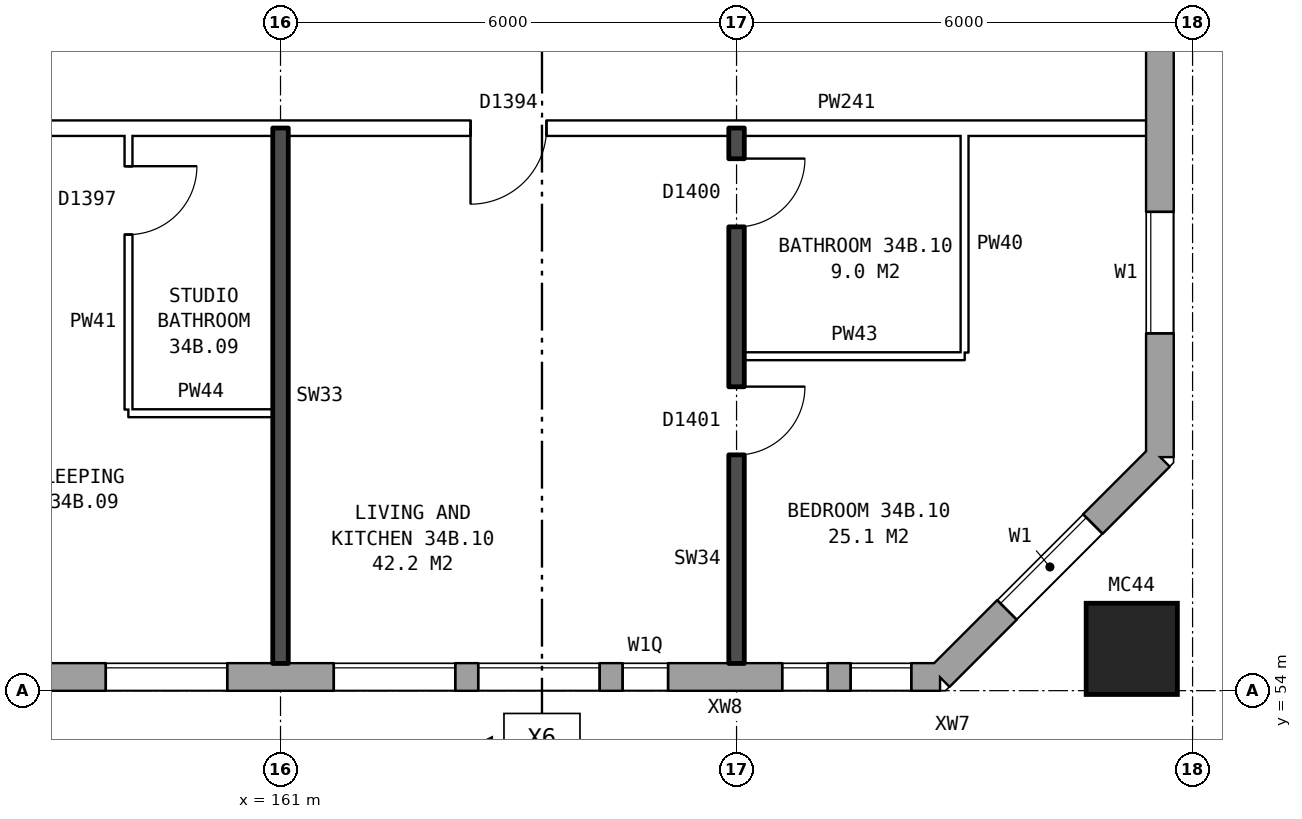
"""IFC4 building model, lengths in metres.
Left out: names, types, materials, properties, quantities, classifications, styles, units other than length and angle.
Written with IfcOpenShell. Run it as: python <this file> out.ifc"""

import sys

from ifc_helpers import new_model, si_unit, direction, frame, frame_2d, origin, origin_2d, place, context, subcontext, project, spatial, rectangle, hollow_rectangle, extrude, element, fill, save


model = new_model("IFC4")
c1 = context("Model", 3, precision=1e-05, world=origin(), true_north=direction((0.0, 1.0)))
c2 = subcontext(c1, "Body", "Model", "MODEL_VIEW")
j1 = project(units=[si_unit("LENGTHUNIT", "METRE"), si_unit("PLANEANGLEUNIT", "RADIAN")], contexts=[c1])
p1 = place(None, origin())
s1 = spatial("IfcSite", under=j1, at=p1, CompositionType="ELEMENT")
p2 = place(p1, origin())
s2 = spatial("IfcBuilding", under=s1, at=p2, CompositionType="ELEMENT")
p3 = place(p2, frame((0.0, 0.0, 123.7)))
s3 = spatial("IfcBuildingStorey", under=s2, at=p3, CompositionType="ELEMENT", Elevation=123.7)
p4 = place(p3, frame((172.2, 54.55, 0.0), z_axis=(0.0, 0.0, 1.0), x_axis=(1.0, 0.0, 0.0)))
e1 = element("IfcColumn", 1, at=p4, inside=s3, PredefinedType="COLUMN", context=c2, shape_type="SweptSolid", body=[
    extrude(hollow_rectangle(XDim=1.2, YDim=1.2, WallThickness=0.065, at=origin_2d()), origin(), (0.0, 0.0, 1.0), 3.1),
])
p5 = place(p3, frame((134.075, 54.18, 0.0), z_axis=(0.0, 0.0, 1.0), x_axis=(1.0, 0.0, 0.0)))
e2 = element("IfcWall", 2, at=p5, inside=s3, PredefinedType="STANDARD", context=c2, shape_type="SweptSolid", body=[
    extrude(rectangle(XDim=35.601, YDim=0.36, at=frame_2d((17.8, 0.0))), origin(), (0.0, 0.0, 1.0), 2.85),
])
p6 = place(p5, frame((0.3, 0.0, 0.8)))
e3 = element("IfcOpeningElement", 3, at=p6, cuts=e2, PredefinedType="OPENING", context=c2, shape_type="SweptSolid", body=[
    extrude(rectangle(XDim=0.8, YDim=1.8, at=frame_2d((0.4, 0.9))), frame((0.0, 0.19, 0.0), z_axis=(0.0, -1.0, 0.0), x_axis=(1.0, 0.0, 0.0)), (0.0, 0.0, 1.0), 0.38),
])
p7 = place(p5, frame((3.425, 0.0, 0.8)))
e4 = element("IfcOpeningElement", 4, at=p7, cuts=e2, PredefinedType="OPENING", context=c2, shape_type="SweptSolid", body=[
    extrude(rectangle(XDim=1.0, YDim=1.2, at=frame_2d((0.5, 0.6))), frame((0.0, 0.19, 0.0), z_axis=(0.0, -1.0, 0.0), x_axis=(1.0, 0.0, 0.0)), (0.0, 0.0, 1.0), 0.38),
])
p8 = place(p5, frame((6.625, 0.0, 0.8)))
e5 = element("IfcOpeningElement", 5, at=p8, cuts=e2, PredefinedType="OPENING", context=c2, shape_type="SweptSolid", body=[
    extrude(rectangle(XDim=1.6, YDim=1.8, at=frame_2d((0.8, 0.9))), frame((0.0, 0.19, 0.0), z_axis=(0.0, -1.0, 0.0), x_axis=(1.0, 0.0, 0.0)), (0.0, 0.0, 1.0), 0.38),
])
p9 = place(p5, frame((9.625, 0.0, 0.8)))
e6 = element("IfcOpeningElement", 6, at=p9, cuts=e2, PredefinedType="OPENING", context=c2, shape_type="SweptSolid", body=[
    extrude(rectangle(XDim=1.6, YDim=1.8, at=frame_2d((0.8, 0.9))), frame((0.0, 0.19, 0.0), z_axis=(0.0, -1.0, 0.0), x_axis=(1.0, 0.0, 0.0)), (0.0, 0.0, 1.0), 0.38),
])
p10 = place(p5, frame((12.625, 0.0, 0.8)))
e7 = element("IfcOpeningElement", 7, at=p10, cuts=e2, PredefinedType="OPENING", context=c2, shape_type="SweptSolid", body=[
    extrude(rectangle(XDim=1.6, YDim=1.8, at=frame_2d((0.8, 0.9))), frame((0.0, 0.19, 0.0), z_axis=(0.0, -1.0, 0.0), x_axis=(1.0, 0.0, 0.0)), (0.0, 0.0, 1.0), 0.38),
])
p11 = place(p5, frame((15.625, 0.0, 0.8)))
e8 = element("IfcOpeningElement", 8, at=p11, cuts=e2, PredefinedType="OPENING", context=c2, shape_type="SweptSolid", body=[
    extrude(rectangle(XDim=1.6, YDim=1.8, at=frame_2d((0.8, 0.9))), frame((0.0, 0.19, 0.0), z_axis=(0.0, -1.0, 0.0), x_axis=(1.0, 0.0, 0.0)), (0.0, 0.0, 1.0), 0.38),
])
p12 = place(p5, frame((18.625, 0.0, 0.8)))
e9 = element("IfcOpeningElement", 9, at=p12, cuts=e2, PredefinedType="OPENING", context=c2, shape_type="SweptSolid", body=[
    extrude(rectangle(XDim=1.6, YDim=1.8, at=frame_2d((0.8, 0.9))), frame((0.0, 0.19, 0.0), z_axis=(0.0, -1.0, 0.0), x_axis=(1.0, 0.0, 0.0)), (0.0, 0.0, 1.0), 0.38),
])
p13 = place(p5, frame((21.625, 0.0, 0.8)))
e10 = element("IfcOpeningElement", 10, at=p13, cuts=e2, PredefinedType="OPENING", context=c2, shape_type="SweptSolid", body=[
    extrude(rectangle(XDim=1.6, YDim=1.8, at=frame_2d((0.8, 0.9))), frame((0.0, 0.19, 0.0), z_axis=(0.0, -1.0, 0.0), x_axis=(1.0, 0.0, 0.0)), (0.0, 0.0, 1.0), 0.38),
])
p14 = place(p5, frame((24.625, 0.0, 0.8)))
e11 = element("IfcOpeningElement", 11, at=p14, cuts=e2, PredefinedType="OPENING", context=c2, shape_type="SweptSolid", body=[
    extrude(rectangle(XDim=1.6, YDim=1.8, at=frame_2d((0.8, 0.9))), frame((0.0, 0.19, 0.0), z_axis=(0.0, -1.0, 0.0), x_axis=(1.0, 0.0, 0.0)), (0.0, 0.0, 1.0), 0.38),
])
p15 = place(p5, frame((27.625, 0.0, 0.8)))
e12 = element("IfcOpeningElement", 12, at=p15, cuts=e2, PredefinedType="OPENING", context=c2, shape_type="SweptSolid", body=[
    extrude(rectangle(XDim=1.6, YDim=1.8, at=frame_2d((0.8, 0.9))), frame((0.0, 0.19, 0.0), z_axis=(0.0, -1.0, 0.0), x_axis=(1.0, 0.0, 0.0)), (0.0, 0.0, 1.0), 0.38),
])
p16 = place(p5, frame((29.525, 0.0, 0.8)))
e13 = element("IfcOpeningElement", 13, at=p16, cuts=e2, PredefinedType="OPENING", context=c2, shape_type="SweptSolid", body=[
    extrude(rectangle(XDim=1.6, YDim=1.8, at=frame_2d((0.8, 0.9))), frame((0.0, 0.19, 0.0), z_axis=(0.0, -1.0, 0.0), x_axis=(1.0, 0.0, 0.0)), (0.0, 0.0, 1.0), 0.38),
])
p17 = place(p5, frame((33.525, 0.0, 1.7)))
e14 = element("IfcOpeningElement", 14, at=p17, cuts=e2, PredefinedType="OPENING", context=c2, shape_type="SweptSolid", body=[
    extrude(rectangle(XDim=0.6, YDim=0.9, at=frame_2d((0.3, 0.45))), frame((0.0, 0.19, 0.0), z_axis=(0.0, -1.0, 0.0), x_axis=(1.0, 0.0, 0.0)), (0.0, 0.0, 1.0), 0.38),
])
p18 = place(p5, frame((1.4, 0.0, 1.6)))
e15 = element("IfcOpeningElement", 15, at=p18, cuts=e2, PredefinedType="OPENING", context=c2, shape_type="SweptSolid", body=[
    extrude(rectangle(XDim=0.6, YDim=0.9, at=frame_2d((0.3, 0.45))), frame((0.0, 0.19, 0.0), z_axis=(0.0, -1.0, 0.0), x_axis=(1.0, 0.0, 0.0)), (0.0, 0.0, 1.0), 0.38),
])
p19 = place(p5, frame((4.725, 0.0, 0.8)))
e16 = element("IfcOpeningElement", 16, at=p19, cuts=e2, PredefinedType="OPENING", context=c2, shape_type="SweptSolid", body=[
    extrude(rectangle(XDim=1.4, YDim=1.8, at=frame_2d((0.7, 0.9))), frame((0.0, 0.19, 0.0), z_axis=(0.0, -1.0, 0.0), x_axis=(1.0, 0.0, 0.0)), (0.0, 0.0, 1.0), 0.38),
])
p20 = place(p5, frame((31.425, 0.0, 0.8)))
e17 = element("IfcOpeningElement", 17, at=p20, cuts=e2, PredefinedType="OPENING", context=c2, shape_type="SweptSolid", body=[
    extrude(rectangle(XDim=0.6, YDim=1.2, at=frame_2d((0.3, 0.6))), frame((0.0, 0.19, 0.0), z_axis=(0.0, -1.0, 0.0), x_axis=(1.0, 0.0, 0.0)), (0.0, 0.0, 1.0), 0.38),
])
p21 = place(p5, frame((34.425, 0.0, 0.8)))
e18 = element("IfcOpeningElement", 18, at=p21, cuts=e2, PredefinedType="OPENING", context=c2, shape_type="SweptSolid", body=[
    extrude(rectangle(XDim=0.8, YDim=1.8, at=frame_2d((0.4, 0.9))), frame((0.0, 0.19, 0.0), z_axis=(0.0, -1.0, 0.0), x_axis=(1.0, 0.0, 0.0)), (0.0, 0.0, 1.0), 0.38),
])
p22 = place(p3, frame((169.675, 54.18, 0.0), z_axis=(0.0, 0.0, 1.0), x_axis=(0.707106781187, 0.707106781187, 0.0)))
e19 = element("IfcWall", 19, at=p22, inside=s3, PredefinedType="STANDARD", context=c2, shape_type="SweptSolid", body=[
    extrude(rectangle(XDim=4.094, YDim=0.36, at=frame_2d((2.047, 0.0))), origin(), (0.0, 0.0, 1.0), 2.85),
])
p23 = place(p22, frame((1.247, 0.0, 0.8)))
e20 = element("IfcOpeningElement", 20, at=p23, cuts=e19, PredefinedType="OPENING", context=c2, shape_type="SweptSolid", body=[
    extrude(rectangle(XDim=1.6, YDim=1.8, at=frame_2d((0.8, 0.9))), frame((0.0, 0.19, 0.0), z_axis=(0.0, -1.0, 0.0), x_axis=(1.0, 0.0, 0.0)), (0.0, 0.0, 1.0), 0.38),
])
p24 = place(p3, frame((172.57, 57.075, 0.0), z_axis=(0.0, 0.0, 1.0), x_axis=(0.0, 1.0, 0.0)))
e21 = element("IfcWall", 21, at=p24, inside=s3, PredefinedType="STANDARD", context=c2, shape_type="SweptSolid", body=[
    extrude(rectangle(XDim=25.851, YDim=0.36, at=frame_2d((12.925, 0.0))), origin(), (0.0, 0.0, 1.0), 2.85),
])
p25 = place(p24, frame((1.625, 0.0, 0.8)))
e22 = element("IfcOpeningElement", 22, at=p25, cuts=e21, PredefinedType="OPENING", context=c2, shape_type="SweptSolid", body=[
    extrude(rectangle(XDim=1.6, YDim=1.8, at=frame_2d((0.8, 0.9))), frame((0.0, 0.19, 0.0), z_axis=(0.0, -1.0, 0.0), x_axis=(1.0, 0.0, 0.0)), (0.0, 0.0, 1.0), 0.38),
])
p26 = place(p24, frame((5.775, 0.0, 0.8)))
e23 = element("IfcOpeningElement", 23, at=p26, cuts=e21, PredefinedType="OPENING", context=c2, shape_type="SweptSolid", body=[
    extrude(rectangle(XDim=0.6, YDim=0.9, at=frame_2d((0.3, 0.45))), frame((0.0, 0.19, 0.0), z_axis=(0.0, -1.0, 0.0), x_axis=(1.0, 0.0, 0.0)), (0.0, 0.0, 1.0), 0.38),
])
p27 = place(p24, frame((7.625, 0.0, 0.8)))
e24 = element("IfcOpeningElement", 24, at=p27, cuts=e21, PredefinedType="OPENING", context=c2, shape_type="SweptSolid", body=[
    extrude(rectangle(XDim=1.6, YDim=1.8, at=frame_2d((0.8, 0.9))), frame((0.0, 0.19, 0.0), z_axis=(0.0, -1.0, 0.0), x_axis=(1.0, 0.0, 0.0)), (0.0, 0.0, 1.0), 0.38),
])
p28 = place(p24, frame((10.625, 0.0, 0.8)))
e25 = element("IfcOpeningElement", 25, at=p28, cuts=e21, PredefinedType="OPENING", context=c2, shape_type="SweptSolid", body=[
    extrude(rectangle(XDim=1.6, YDim=1.8, at=frame_2d((0.8, 0.9))), frame((0.0, 0.19, 0.0), z_axis=(0.0, -1.0, 0.0), x_axis=(1.0, 0.0, 0.0)), (0.0, 0.0, 1.0), 0.38),
])
p29 = place(p24, frame((13.625, 0.0, 0.8)))
e26 = element("IfcOpeningElement", 26, at=p29, cuts=e21, PredefinedType="OPENING", context=c2, shape_type="SweptSolid", body=[
    extrude(rectangle(XDim=1.6, YDim=1.8, at=frame_2d((0.8, 0.9))), frame((0.0, 0.19, 0.0), z_axis=(0.0, -1.0, 0.0), x_axis=(1.0, 0.0, 0.0)), (0.0, 0.0, 1.0), 0.38),
])
p30 = place(p24, frame((16.625, 0.0, 0.8)))
e27 = element("IfcOpeningElement", 27, at=p30, cuts=e21, PredefinedType="OPENING", context=c2, shape_type="SweptSolid", body=[
    extrude(rectangle(XDim=1.6, YDim=1.8, at=frame_2d((0.8, 0.9))), frame((0.0, 0.19, 0.0), z_axis=(0.0, -1.0, 0.0), x_axis=(1.0, 0.0, 0.0)), (0.0, 0.0, 1.0), 0.38),
])
p31 = place(p24, frame((6.675, 0.0, 0.8)))
e28 = element("IfcOpeningElement", 28, at=p31, cuts=e21, PredefinedType="OPENING", context=c2, shape_type="SweptSolid", body=[
    extrude(rectangle(XDim=0.6, YDim=1.5, at=frame_2d((0.3, 0.75))), frame((0.0, 0.19, 0.0), z_axis=(0.0, -1.0, 0.0), x_axis=(1.0, 0.0, 0.0)), (0.0, 0.0, 1.0), 0.38),
])
p32 = place(p24, frame((22.625, 0.0, 0.8)))
e29 = element("IfcOpeningElement", 29, at=p32, cuts=e21, PredefinedType="OPENING", context=c2, shape_type="SweptSolid", body=[
    extrude(rectangle(XDim=1.6, YDim=1.8, at=frame_2d((0.8, 0.9))), frame((0.0, 0.19, 0.0), z_axis=(0.0, -1.0, 0.0), x_axis=(1.0, 0.0, 0.0)), (0.0, 0.0, 1.0), 0.38),
])
p33 = place(p24, frame((9.525, 0.0, 0.8)))
e30 = element("IfcOpeningElement", 30, at=p33, cuts=e21, PredefinedType="OPENING", context=c2, shape_type="SweptSolid", body=[
    extrude(rectangle(XDim=0.8, YDim=1.8, at=frame_2d((0.4, 0.9))), frame((0.0, 0.19, 0.0), z_axis=(0.0, -1.0, 0.0), x_axis=(1.0, 0.0, 0.0)), (0.0, 0.0, 1.0), 0.38),
])
p34 = place(p24, frame((12.525, 0.0, 0.8)))
e31 = element("IfcOpeningElement", 31, at=p34, cuts=e21, PredefinedType="OPENING", context=c2, shape_type="SweptSolid", body=[
    extrude(rectangle(XDim=0.8, YDim=1.8, at=frame_2d((0.4, 0.9))), frame((0.0, 0.19, 0.0), z_axis=(0.0, -1.0, 0.0), x_axis=(1.0, 0.0, 0.0)), (0.0, 0.0, 1.0), 0.38),
])
p35 = place(p24, frame((15.525, 0.0, 0.8)))
e32 = element("IfcOpeningElement", 32, at=p35, cuts=e21, PredefinedType="OPENING", context=c2, shape_type="SweptSolid", body=[
    extrude(rectangle(XDim=0.8, YDim=1.8, at=frame_2d((0.4, 0.9))), frame((0.0, 0.19, 0.0), z_axis=(0.0, -1.0, 0.0), x_axis=(1.0, 0.0, 0.0)), (0.0, 0.0, 1.0), 0.38),
])
p36 = place(p24, frame((18.525, 0.0, 0.8)))
e33 = element("IfcOpeningElement", 33, at=p36, cuts=e21, PredefinedType="OPENING", context=c2, shape_type="SweptSolid", body=[
    extrude(rectangle(XDim=0.6, YDim=1.5, at=frame_2d((0.3, 0.75))), frame((0.0, 0.19, 0.0), z_axis=(0.0, -1.0, 0.0), x_axis=(1.0, 0.0, 0.0)), (0.0, 0.0, 1.0), 0.38),
])
p37 = place(p24, frame((19.425, 0.0, 0.8)))
e34 = element("IfcOpeningElement", 34, at=p37, cuts=e21, PredefinedType="OPENING", context=c2, shape_type="SweptSolid", body=[
    extrude(rectangle(XDim=0.6, YDim=0.9, at=frame_2d((0.3, 0.45))), frame((0.0, 0.19, 0.0), z_axis=(0.0, -1.0, 0.0), x_axis=(1.0, 0.0, 0.0)), (0.0, 0.0, 1.0), 0.38),
])
p38 = place(p3, frame((159.0, 57.65, 0.0), z_axis=(0.0, 0.0, 1.0), x_axis=(1.0, 0.0, 0.0)))
e35 = element("IfcWall", 35, at=p38, inside=s3, PredefinedType="PARTITIONING", context=c2, shape_type="SweptSolid", body=[
    extrude(rectangle(XDim=1.9, YDim=0.1, at=frame_2d((0.95, 0.0))), origin(), (0.0, 0.0, 1.0), 2.85),
])
p39 = place(p3, frame((167.1, 58.4, 0.0), z_axis=(0.0, 0.0, 1.0), x_axis=(1.0, 0.0, 0.0)))
e36 = element("IfcWall", 36, at=p39, inside=s3, PredefinedType="PARTITIONING", context=c2, shape_type="SweptSolid", body=[
    extrude(rectangle(XDim=2.9, YDim=0.1, at=frame_2d((1.45, 0.0))), origin(), (0.0, 0.0, 1.0), 2.85),
])
p40 = place(p3, frame((155.1, 61.4, 0.0), z_axis=(0.0, 0.0, 1.0), x_axis=(1.0, 0.0, 0.0)))
e37 = element("IfcWall", 37, at=p40, inside=s3, PredefinedType="PARTITIONING", context=c2, shape_type="SweptSolid", body=[
    extrude(rectangle(XDim=17.29, YDim=0.2, at=frame_2d((8.645, 0.0))), origin(), (0.0, 0.0, 1.0), 2.85),
])
p41 = place(p40, frame((1.45, 0.0, 0.0)))
e38 = element("IfcOpeningElement", 38, at=p41, cuts=e37, PredefinedType="OPENING", context=c2, shape_type="SweptSolid", body=[
    extrude(rectangle(XDim=1.0, YDim=2.1, at=frame_2d((0.5, 1.05))), frame((0.0, 0.11, 0.0), z_axis=(0.0, -1.0, 0.0), x_axis=(1.0, 0.0, 0.0)), (0.0, 0.0, 1.0), 0.22),
])
p42 = place(p40, frame((8.4, 0.0, 0.0)))
e39 = element("IfcOpeningElement", 39, at=p42, cuts=e37, PredefinedType="OPENING", context=c2, shape_type="SweptSolid", body=[
    extrude(rectangle(XDim=1.0, YDim=2.1, at=frame_2d((0.5, 1.05))), frame((0.0, 0.11, 0.0), z_axis=(0.0, -1.0, 0.0), x_axis=(1.0, 0.0, 0.0)), (0.0, 0.0, 1.0), 0.22),
])
p43 = place(p3, frame((159.0, 57.7, 0.0), z_axis=(0.0, 0.0, 1.0), x_axis=(0.0, 1.0, 0.0)))
e40 = element("IfcWall", 40, at=p43, inside=s3, PredefinedType="PARTITIONING", context=c2, shape_type="SweptSolid", body=[
    extrude(rectangle(XDim=3.6, YDim=0.1, at=frame_2d((1.8, 0.0))), origin(), (0.0, 0.0, 1.0), 2.85),
])
p44 = place(p43, frame((2.3, 0.0, 0.0)))
e41 = element("IfcOpeningElement", 41, at=p44, cuts=e40, PredefinedType="OPENING", context=c2, shape_type="SweptSolid", body=[
    extrude(rectangle(XDim=0.9, YDim=2.1, at=frame_2d((0.45, 1.05))), frame((0.0, 0.06, 0.0), z_axis=(0.0, -1.0, 0.0), x_axis=(1.0, 0.0, 0.0)), (0.0, 0.0, 1.0), 0.12),
])
p45 = place(p3, frame((161.0, 54.36, 0.0), z_axis=(0.0, 0.0, 1.0), x_axis=(0.0, 1.0, 0.0)))
e42 = element("IfcWall", 42, at=p45, inside=s3, PredefinedType="SOLIDWALL", context=c2, shape_type="SweptSolid", body=[
    extrude(rectangle(XDim=7.04, YDim=0.2, at=frame_2d((3.52, 0.0))), origin(), (0.0, 0.0, 1.0), 2.85),
])
p46 = place(p3, frame((167.0, 54.36, 0.0), z_axis=(0.0, 0.0, 1.0), x_axis=(0.0, 1.0, 0.0)))
e43 = element("IfcWall", 43, at=p46, inside=s3, PredefinedType="SOLIDWALL", context=c2, shape_type="SweptSolid", body=[
    extrude(rectangle(XDim=7.04, YDim=0.2, at=frame_2d((3.52, 0.0))), origin(), (0.0, 0.0, 1.0), 2.85),
])
p47 = place(p46, frame((2.74, 0.0, 0.0)))
e44 = element("IfcOpeningElement", 44, at=p47, cuts=e43, PredefinedType="OPENING", context=c2, shape_type="SweptSolid", body=[
    extrude(rectangle(XDim=0.9, YDim=2.1, at=frame_2d((0.45, 1.05))), frame((0.0, 0.11, 0.0), z_axis=(0.0, -1.0, 0.0), x_axis=(1.0, 0.0, 0.0)), (0.0, 0.0, 1.0), 0.22),
])
p48 = place(p46, frame((5.74, 0.0, 0.0)))
e45 = element("IfcOpeningElement", 45, at=p48, cuts=e43, PredefinedType="OPENING", context=c2, shape_type="SweptSolid", body=[
    extrude(rectangle(XDim=0.9, YDim=2.1, at=frame_2d((0.45, 1.05))), frame((0.0, 0.11, 0.0), z_axis=(0.0, -1.0, 0.0), x_axis=(1.0, 0.0, 0.0)), (0.0, 0.0, 1.0), 0.22),
])
p49 = place(p3, frame((170.0, 58.45, 0.0), z_axis=(0.0, 0.0, 1.0), x_axis=(0.0, 1.0, 0.0)))
e46 = element("IfcWall", 46, at=p49, inside=s3, PredefinedType="PARTITIONING", context=c2, shape_type="SweptSolid", body=[
    extrude(rectangle(XDim=2.85, YDim=0.1, at=frame_2d((1.425, 0.0))), origin(), (0.0, 0.0, 1.0), 2.85),
])
p50 = place(p14, origin())
e47 = element("IfcWindow", 47, at=p50, inside=s3, PartitioningType="SINGLE_PANEL", PredefinedType="WINDOW", context=c2, shape_type="SweptSolid", body=[
    extrude(rectangle(XDim=1.6, YDim=1.8, at=frame_2d((0.8, 0.9))), frame((0.0, 0.15, 0.0), z_axis=(0.0, -1.0, 0.0), x_axis=(1.0, 0.0, 0.0)), (0.0, 0.0, 1.0), 0.06),
])
fill(e11, e47)
p51 = place(p15, origin())
e48 = element("IfcWindow", 48, at=p51, inside=s3, PartitioningType="SINGLE_PANEL", PredefinedType="WINDOW", context=c2, shape_type="SweptSolid", body=[
    extrude(rectangle(XDim=1.6, YDim=1.8, at=frame_2d((0.8, 0.9))), frame((0.0, 0.15, 0.0), z_axis=(0.0, -1.0, 0.0), x_axis=(1.0, 0.0, 0.0)), (0.0, 0.0, 1.0), 0.06),
])
fill(e12, e48)
p52 = place(p16, origin())
e49 = element("IfcWindow", 49, at=p52, inside=s3, PartitioningType="SINGLE_PANEL", PredefinedType="WINDOW", context=c2, shape_type="SweptSolid", body=[
    extrude(rectangle(XDim=1.6, YDim=1.8, at=frame_2d((0.8, 0.9))), frame((0.0, 0.15, 0.0), z_axis=(0.0, -1.0, 0.0), x_axis=(1.0, 0.0, 0.0)), (0.0, 0.0, 1.0), 0.06),
])
fill(e13, e49)
p53 = place(p17, origin())
e50 = element("IfcWindow", 50, at=p53, inside=s3, PartitioningType="SINGLE_PANEL", PredefinedType="WINDOW", context=c2, shape_type="SweptSolid", body=[
    extrude(rectangle(XDim=0.6, YDim=0.9, at=frame_2d((0.3, 0.45))), frame((0.0, 0.15, 0.0), z_axis=(0.0, -1.0, 0.0), x_axis=(1.0, 0.0, 0.0)), (0.0, 0.0, 1.0), 0.06),
])
fill(e14, e50)
p54 = place(p23, origin())
e51 = element("IfcWindow", 51, at=p54, inside=s3, PartitioningType="SINGLE_PANEL", PredefinedType="WINDOW", context=c2, shape_type="SweptSolid", body=[
    extrude(rectangle(XDim=1.6, YDim=1.8, at=frame_2d((0.8, 0.9))), frame((0.0, 0.15, 0.0), z_axis=(0.0, -1.0, 0.0), x_axis=(1.0, 0.0, 0.0)), (0.0, 0.0, 1.0), 0.06),
])
fill(e20, e51)
p55 = place(p25, origin())
e52 = element("IfcWindow", 52, at=p55, inside=s3, PartitioningType="SINGLE_PANEL", PredefinedType="WINDOW", context=c2, shape_type="SweptSolid", body=[
    extrude(rectangle(XDim=1.6, YDim=1.8, at=frame_2d((0.8, 0.9))), frame((0.0, 0.15, 0.0), z_axis=(0.0, -1.0, 0.0), x_axis=(1.0, 0.0, 0.0)), (0.0, 0.0, 1.0), 0.06),
])
fill(e22, e52)
p56 = place(p44, frame((0.9, 0.0, 0.0), z_axis=(0.0, 0.0, 1.0), x_axis=(-1.0, 0.0, 0.0)))
e53 = element("IfcDoor", 53, at=p56, inside=s3, OperationType="SINGLE_SWING_LEFT", PredefinedType="DOOR", context=c2, shape_type="SweptSolid", body=[
    extrude(rectangle(XDim=0.9, YDim=2.1, at=frame_2d((0.45, 1.05))), frame((0.0, 0.025, 0.0), z_axis=(0.0, -1.0, 0.0), x_axis=(1.0, 0.0, 0.0)), (0.0, 0.0, 1.0), 0.05),
])
fill(e41, e53)
p57 = place(p47, frame((0.9, 0.0, 0.0), z_axis=(0.0, 0.0, 1.0), x_axis=(-1.0, 0.0, 0.0)))
e54 = element("IfcDoor", 54, at=p57, inside=s3, OperationType="SINGLE_SWING_LEFT", PredefinedType="DOOR", context=c2, shape_type="SweptSolid", body=[
    extrude(rectangle(XDim=0.9, YDim=2.1, at=frame_2d((0.45, 1.05))), frame((0.0, 0.025, 0.0), z_axis=(0.0, -1.0, 0.0), x_axis=(1.0, 0.0, 0.0)), (0.0, 0.0, 1.0), 0.05),
])
fill(e44, e54)
p58 = place(p42, frame((1.0, 0.0, 0.0), z_axis=(0.0, 0.0, 1.0), x_axis=(-1.0, 0.0, 0.0)))
e55 = element("IfcDoor", 55, at=p58, inside=s3, OperationType="SINGLE_SWING_RIGHT", PredefinedType="DOOR", context=c2, shape_type="SweptSolid", body=[
    extrude(rectangle(XDim=1.0, YDim=2.1, at=frame_2d((0.5, 1.05))), frame((0.0, 0.025, 0.0), z_axis=(0.0, -1.0, 0.0), x_axis=(1.0, 0.0, 0.0)), (0.0, 0.0, 1.0), 0.05),
])
fill(e39, e55)
p59 = place(p48, frame((0.9, 0.0, 0.0), z_axis=(0.0, 0.0, 1.0), x_axis=(-1.0, 0.0, 0.0)))
e56 = element("IfcDoor", 56, at=p59, inside=s3, OperationType="SINGLE_SWING_LEFT", PredefinedType="DOOR", context=c2, shape_type="SweptSolid", body=[
    extrude(rectangle(XDim=0.9, YDim=2.1, at=frame_2d((0.45, 1.05))), frame((0.0, 0.025, 0.0), z_axis=(0.0, -1.0, 0.0), x_axis=(1.0, 0.0, 0.0)), (0.0, 0.0, 1.0), 0.05),
])
fill(e45, e56)
p60 = place(p20, origin())
e57 = element("IfcWindow", 57, at=p60, inside=s3, PartitioningType="SINGLE_PANEL", PredefinedType="WINDOW", context=c2, shape_type="SweptSolid", body=[
    extrude(rectangle(XDim=0.6, YDim=1.2, at=frame_2d((0.3, 0.6))), frame((0.0, 0.15, 0.0), z_axis=(0.0, -1.0, 0.0), x_axis=(1.0, 0.0, 0.0)), (0.0, 0.0, 1.0), 0.06),
])
fill(e17, e57)
p61 = place(p21, origin())
e58 = element("IfcWindow", 58, at=p61, inside=s3, PartitioningType="SINGLE_PANEL", PredefinedType="WINDOW", context=c2, shape_type="SweptSolid", body=[
    extrude(rectangle(XDim=0.8, YDim=1.8, at=frame_2d((0.4, 0.9))), frame((0.0, 0.15, 0.0), z_axis=(0.0, -1.0, 0.0), x_axis=(1.0, 0.0, 0.0)), (0.0, 0.0, 1.0), 0.06),
])
fill(e18, e58)
save(model, sys.argv[1])
